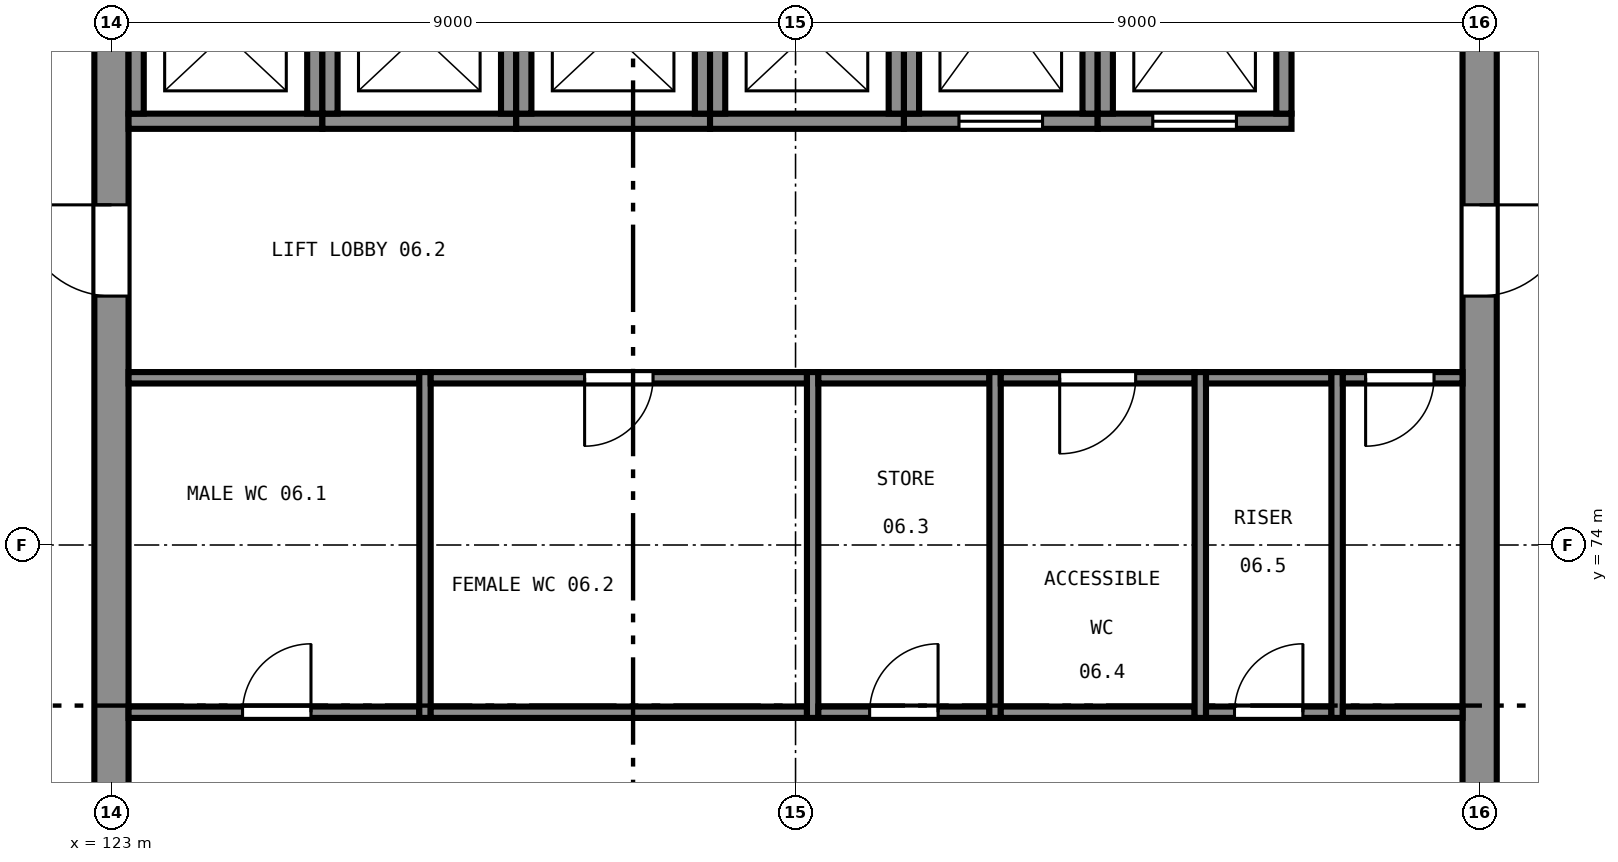
"""IFC4 building model, lengths in metres.
Left out: names, types, materials, properties, quantities, classifications, styles, units other than length and angle.
Written with IfcOpenShell. Run it as: python <this file> out.ifc"""

import sys

from ifc_helpers import new_model, si_unit, direction, frame, frame_2d, origin, place, context, subcontext, project, spatial, rectangle, extrude, element, fill, save


model = new_model("IFC4")
c1 = context("Model", 3, precision=1e-05, world=origin(), true_north=direction((0.0, 1.0)))
c2 = subcontext(c1, "Body", "Model", "MODEL_VIEW")
j1 = project(units=[si_unit("LENGTHUNIT", "METRE"), si_unit("PLANEANGLEUNIT", "RADIAN")], contexts=[c1])
p1 = place(None, origin())
s1 = spatial("IfcSite", under=j1, at=p1, CompositionType="ELEMENT")
p2 = place(p1, origin())
s2 = spatial("IfcBuilding", under=s1, at=p2, CompositionType="ELEMENT")
p3 = place(p2, frame((0.0, 0.0, 25.5)))
s3 = spatial("IfcBuildingStorey", under=s2, at=p3, CompositionType="ELEMENT", Elevation=25.5)
p4 = place(p3, frame((141.0, 65.225, 0.0), z_axis=(0.0, 0.0, 1.0), x_axis=(0.0, 1.0, 0.0)))
e1 = element("IfcWall", 1, at=p4, inside=s3, PredefinedType="SHEAR", context=c2, shape_type="SweptSolid", body=[
    extrude(rectangle(XDim=17.55, YDim=0.45, at=frame_2d((8.775, 0.0))), origin(), (0.0, 0.0, 1.0), 4.0),
])
p5 = place(p4, frame((4.3, 0.0, 0.0)))
e2 = element("IfcOpeningElement", 2, at=p5, cuts=e1, PredefinedType="OPENING", context=c2, shape_type="SweptSolid", body=[
    extrude(rectangle(XDim=1.2, YDim=2.1, at=frame_2d((0.6, 1.05))), frame((0.0, 0.235, 0.0), z_axis=(0.0, -1.0, 0.0), x_axis=(1.0, 0.0, 0.0)), (0.0, 0.0, 1.0), 0.47),
])
p6 = place(p4, frame((12.05, 0.0, 0.0)))
e3 = element("IfcOpeningElement", 3, at=p6, cuts=e1, PredefinedType="OPENING", context=c2, shape_type="SweptSolid", body=[
    extrude(rectangle(XDim=1.2, YDim=2.1, at=frame_2d((0.6, 1.05))), frame((0.0, 0.235, 0.0), z_axis=(0.0, -1.0, 0.0), x_axis=(1.0, 0.0, 0.0)), (0.0, 0.0, 1.0), 0.47),
])
p7 = place(p3, frame((123.0, 82.775, 0.0), z_axis=(0.0, 0.0, 1.0), x_axis=(0.0, -1.0, 0.0)))
e4 = element("IfcWall", 4, at=p7, inside=s3, PredefinedType="SHEAR", context=c2, shape_type="SweptSolid", body=[
    extrude(rectangle(XDim=17.55, YDim=0.45, at=frame_2d((8.775, 0.0))), origin(), (0.0, 0.0, 1.0), 4.0),
])
p8 = place(p7, frame((12.05, 0.0, 0.0)))
e5 = element("IfcOpeningElement", 5, at=p8, cuts=e4, PredefinedType="OPENING", context=c2, shape_type="SweptSolid", body=[
    extrude(rectangle(XDim=1.2, YDim=2.1, at=frame_2d((0.6, 1.05))), frame((0.0, 0.235, 0.0), z_axis=(0.0, -1.0, 0.0), x_axis=(1.0, 0.0, 0.0)), (0.0, 0.0, 1.0), 0.47),
])
p9 = place(p7, frame((4.3, 0.0, 0.0)))
e6 = element("IfcOpeningElement", 6, at=p9, cuts=e4, PredefinedType="OPENING", context=c2, shape_type="SweptSolid", body=[
    extrude(rectangle(XDim=1.2, YDim=2.1, at=frame_2d((0.6, 1.05))), frame((0.0, 0.235, 0.0), z_axis=(0.0, -1.0, 0.0), x_axis=(1.0, 0.0, 0.0)), (0.0, 0.0, 1.0), 0.47),
])
p10 = place(p3, frame((123.225, 79.575, 0.0), z_axis=(0.0, 0.0, 1.0), x_axis=(1.0, 0.0, 0.0)))
e7 = element("IfcWall", 7, at=p10, inside=s3, PredefinedType="SHEAR", context=c2, shape_type="SweptSolid", body=[
    extrude(rectangle(XDim=2.55, YDim=0.2, at=frame_2d((1.275, 0.0))), origin(), (0.0, 0.0, 1.0), 4.0),
])
for number, where, z_axis, x_axis in (
    (8, (125.675, 79.675, 0.0), (0.0, 0.0, 1.0), (0.0, 1.0, 0.0)),
    (9, (123.325, 81.775, 0.0), (0.0, 0.0, 1.0), (0.0, -1.0, 0.0)),
):
    element("IfcWall", number, at=place(p3, frame(where, z_axis=z_axis, x_axis=x_axis)), inside=s3, PredefinedType="SHEAR", context=c2, shape_type="SweptSolid", body=[
        extrude(rectangle(XDim=2.1, YDim=0.2, at=frame_2d((1.05, 0.0))), origin(), (0.0, 0.0, 1.0), 4.0),
    ])
p11 = place(p3, frame((125.775, 79.575, 0.0), z_axis=(0.0, 0.0, 1.0), x_axis=(1.0, 0.0, 0.0)))
e10 = element("IfcWall", 10, at=p11, inside=s3, PredefinedType="SHEAR", context=c2, shape_type="SweptSolid", body=[
    extrude(rectangle(XDim=2.55, YDim=0.2, at=frame_2d((1.275, 0.0))), origin(), (0.0, 0.0, 1.0), 4.0),
])
for number, where, z_axis, x_axis in (
    (11, (128.225, 79.675, 0.0), (0.0, 0.0, 1.0), (0.0, 1.0, 0.0)),
    (12, (125.875, 81.775, 0.0), (0.0, 0.0, 1.0), (0.0, -1.0, 0.0)),
):
    element("IfcWall", number, at=place(p3, frame(where, z_axis=z_axis, x_axis=x_axis)), inside=s3, PredefinedType="SHEAR", context=c2, shape_type="SweptSolid", body=[
        extrude(rectangle(XDim=2.1, YDim=0.2, at=frame_2d((1.05, 0.0))), origin(), (0.0, 0.0, 1.0), 4.0),
    ])
p12 = place(p3, frame((128.325, 79.575, 0.0), z_axis=(0.0, 0.0, 1.0), x_axis=(1.0, 0.0, 0.0)))
e13 = element("IfcWall", 13, at=p12, inside=s3, PredefinedType="SHEAR", context=c2, shape_type="SweptSolid", body=[
    extrude(rectangle(XDim=2.55, YDim=0.2, at=frame_2d((1.275, 0.0))), origin(), (0.0, 0.0, 1.0), 4.0),
])
for number, where, z_axis, x_axis in (
    (14, (130.775, 79.675, 0.0), (0.0, 0.0, 1.0), (0.0, 1.0, 0.0)),
    (15, (128.425, 81.775, 0.0), (0.0, 0.0, 1.0), (0.0, -1.0, 0.0)),
):
    element("IfcWall", number, at=place(p3, frame(where, z_axis=z_axis, x_axis=x_axis)), inside=s3, PredefinedType="SHEAR", context=c2, shape_type="SweptSolid", body=[
        extrude(rectangle(XDim=2.1, YDim=0.2, at=frame_2d((1.05, 0.0))), origin(), (0.0, 0.0, 1.0), 4.0),
    ])
p13 = place(p3, frame((130.875, 79.575, 0.0), z_axis=(0.0, 0.0, 1.0), x_axis=(1.0, 0.0, 0.0)))
e16 = element("IfcWall", 16, at=p13, inside=s3, PredefinedType="SHEAR", context=c2, shape_type="SweptSolid", body=[
    extrude(rectangle(XDim=2.55, YDim=0.2, at=frame_2d((1.275, 0.0))), origin(), (0.0, 0.0, 1.0), 4.0),
])
for number, where, z_axis, x_axis in (
    (17, (133.325, 79.675, 0.0), (0.0, 0.0, 1.0), (0.0, 1.0, 0.0)),
    (18, (130.975, 81.775, 0.0), (0.0, 0.0, 1.0), (0.0, -1.0, 0.0)),
):
    element("IfcWall", number, at=place(p3, frame(where, z_axis=z_axis, x_axis=x_axis)), inside=s3, PredefinedType="SHEAR", context=c2, shape_type="SweptSolid", body=[
        extrude(rectangle(XDim=2.1, YDim=0.2, at=frame_2d((1.05, 0.0))), origin(), (0.0, 0.0, 1.0), 4.0),
    ])
p14 = place(p3, frame((133.425, 79.575, 0.0), z_axis=(0.0, 0.0, 1.0), x_axis=(1.0, 0.0, 0.0)))
e19 = element("IfcWall", 19, at=p14, inside=s3, PredefinedType="SHEAR", context=c2, shape_type="SweptSolid", body=[
    extrude(rectangle(XDim=2.55, YDim=0.2, at=frame_2d((1.275, 0.0))), origin(), (0.0, 0.0, 1.0), 4.0),
])
p15 = place(p14, frame((0.725, 0.0, 0.0)))
e20 = element("IfcOpeningElement", 20, at=p15, cuts=e19, PredefinedType="OPENING", context=c2, shape_type="SweptSolid", body=[
    extrude(rectangle(XDim=1.1, YDim=2.1, at=frame_2d((0.55, 1.05))), frame((0.0, 0.11, 0.0), z_axis=(0.0, -1.0, 0.0), x_axis=(1.0, 0.0, 0.0)), (0.0, 0.0, 1.0), 0.22),
])
for number, where, z_axis, x_axis in (
    (21, (135.875, 79.675, 0.0), (0.0, 0.0, 1.0), (0.0, 1.0, 0.0)),
    (22, (133.525, 82.475, 0.0), (0.0, 0.0, 1.0), (0.0, -1.0, 0.0)),
):
    element("IfcWall", number, at=place(p3, frame(where, z_axis=z_axis, x_axis=x_axis)), inside=s3, PredefinedType="SHEAR", context=c2, shape_type="SweptSolid", body=[
        extrude(rectangle(XDim=2.8, YDim=0.2, at=frame_2d((1.4, 0.0))), origin(), (0.0, 0.0, 1.0), 4.0),
    ])
p16 = place(p3, frame((135.975, 79.575, 0.0), z_axis=(0.0, 0.0, 1.0), x_axis=(1.0, 0.0, 0.0)))
e23 = element("IfcWall", 23, at=p16, inside=s3, PredefinedType="SHEAR", context=c2, shape_type="SweptSolid", body=[
    extrude(rectangle(XDim=2.55, YDim=0.2, at=frame_2d((1.275, 0.0))), origin(), (0.0, 0.0, 1.0), 4.0),
])
p17 = place(p16, frame((0.725, 0.0, 0.0)))
e24 = element("IfcOpeningElement", 24, at=p17, cuts=e23, PredefinedType="OPENING", context=c2, shape_type="SweptSolid", body=[
    extrude(rectangle(XDim=1.1, YDim=2.1, at=frame_2d((0.55, 1.05))), frame((0.0, 0.11, 0.0), z_axis=(0.0, -1.0, 0.0), x_axis=(1.0, 0.0, 0.0)), (0.0, 0.0, 1.0), 0.22),
])
for number, where, z_axis, x_axis in (
    (25, (138.425, 79.675, 0.0), (0.0, 0.0, 1.0), (0.0, 1.0, 0.0)),
    (26, (136.075, 82.475, 0.0), (0.0, 0.0, 1.0), (0.0, -1.0, 0.0)),
):
    element("IfcWall", number, at=place(p3, frame(where, z_axis=z_axis, x_axis=x_axis)), inside=s3, PredefinedType="SHEAR", context=c2, shape_type="SweptSolid", body=[
        extrude(rectangle(XDim=2.8, YDim=0.2, at=frame_2d((1.4, 0.0))), origin(), (0.0, 0.0, 1.0), 4.0),
    ])
p18 = place(p3, frame((127.125, 71.725, 0.0), z_axis=(0.0, 0.0, 1.0), x_axis=(0.0, 1.0, 0.0)))
e27 = element("IfcWall", 27, at=p18, inside=s3, PredefinedType="PARTITIONING", context=c2, shape_type="SweptSolid", body=[
    extrude(rectangle(XDim=4.55, YDim=0.15, at=frame_2d((2.275, 0.0))), origin(), (0.0, 0.0, 1.0), 3.58),
])
p19 = place(p3, frame((123.225, 71.8, 0.0), z_axis=(0.0, 0.0, 1.0), x_axis=(1.0, 0.0, 0.0)))
e28 = element("IfcWall", 28, at=p19, inside=s3, PredefinedType="PARTITIONING", context=c2, shape_type="SweptSolid", body=[
    extrude(rectangle(XDim=3.825, YDim=0.15, at=frame_2d((1.913, 0.0))), origin(), (0.0, 0.0, 1.0), 3.58),
])
p20 = place(p19, frame((1.5, 0.0, 0.0)))
e29 = element("IfcOpeningElement", 29, at=p20, cuts=e28, PredefinedType="OPENING", context=c2, shape_type="SweptSolid", body=[
    extrude(rectangle(XDim=0.9, YDim=2.1, at=frame_2d((0.45, 1.05))), frame((0.0, 0.085, 0.0), z_axis=(0.0, -1.0, 0.0), x_axis=(1.0, 0.0, 0.0)), (0.0, 0.0, 1.0), 0.17),
])
p21 = place(p3, frame((123.225, 76.2, 0.0), z_axis=(0.0, 0.0, 1.0), x_axis=(1.0, 0.0, 0.0)))
e30 = element("IfcWall", 30, at=p21, inside=s3, PredefinedType="PARTITIONING", context=c2, shape_type="SweptSolid", body=[
    extrude(rectangle(XDim=3.825, YDim=0.15, at=frame_2d((1.913, 0.0))), origin(), (0.0, 0.0, 1.0), 3.58),
])
p22 = place(p3, frame((132.225, 71.725, 0.0), z_axis=(0.0, 0.0, 1.0), x_axis=(0.0, 1.0, 0.0)))
e31 = element("IfcWall", 31, at=p22, inside=s3, PredefinedType="PARTITIONING", context=c2, shape_type="SweptSolid", body=[
    extrude(rectangle(XDim=4.55, YDim=0.15, at=frame_2d((2.275, 0.0))), origin(), (0.0, 0.0, 1.0), 3.58),
])
p23 = place(p3, frame((127.2, 71.8, 0.0), z_axis=(0.0, 0.0, 1.0), x_axis=(1.0, 0.0, 0.0)))
e32 = element("IfcWall", 32, at=p23, inside=s3, PredefinedType="PARTITIONING", context=c2, shape_type="SweptSolid", body=[
    extrude(rectangle(XDim=4.95, YDim=0.15, at=frame_2d((2.475, 0.0))), origin(), (0.0, 0.0, 1.0), 3.58),
])
p24 = place(p3, frame((127.2, 76.2, 0.0), z_axis=(0.0, 0.0, 1.0), x_axis=(1.0, 0.0, 0.0)))
e33 = element("IfcWall", 33, at=p24, inside=s3, PredefinedType="PARTITIONING", context=c2, shape_type="SweptSolid", body=[
    extrude(rectangle(XDim=4.95, YDim=0.15, at=frame_2d((2.475, 0.0))), origin(), (0.0, 0.0, 1.0), 3.58),
])
p25 = place(p24, frame((2.025, 0.0, 0.0)))
e34 = element("IfcOpeningElement", 34, at=p25, cuts=e33, PredefinedType="OPENING", context=c2, shape_type="SweptSolid", body=[
    extrude(rectangle(XDim=0.9, YDim=2.1, at=frame_2d((0.45, 1.05))), frame((0.0, 0.085, 0.0), z_axis=(0.0, -1.0, 0.0), x_axis=(1.0, 0.0, 0.0)), (0.0, 0.0, 1.0), 0.17),
])
p26 = place(p3, frame((134.625, 71.725, 0.0), z_axis=(0.0, 0.0, 1.0), x_axis=(0.0, 1.0, 0.0)))
e35 = element("IfcWall", 35, at=p26, inside=s3, PredefinedType="PARTITIONING", context=c2, shape_type="SweptSolid", body=[
    extrude(rectangle(XDim=4.55, YDim=0.15, at=frame_2d((2.275, 0.0))), origin(), (0.0, 0.0, 1.0), 3.58),
])
p27 = place(p3, frame((132.3, 71.8, 0.0), z_axis=(0.0, 0.0, 1.0), x_axis=(1.0, 0.0, 0.0)))
e36 = element("IfcWall", 36, at=p27, inside=s3, PredefinedType="PARTITIONING", context=c2, shape_type="SweptSolid", body=[
    extrude(rectangle(XDim=2.25, YDim=0.15, at=frame_2d((1.125, 0.0))), origin(), (0.0, 0.0, 1.0), 3.58),
])
p28 = place(p27, frame((0.675, 0.0, 0.0)))
e37 = element("IfcOpeningElement", 37, at=p28, cuts=e36, PredefinedType="OPENING", context=c2, shape_type="SweptSolid", body=[
    extrude(rectangle(XDim=0.9, YDim=2.1, at=frame_2d((0.45, 1.05))), frame((0.0, 0.085, 0.0), z_axis=(0.0, -1.0, 0.0), x_axis=(1.0, 0.0, 0.0)), (0.0, 0.0, 1.0), 0.17),
])
p29 = place(p3, frame((132.3, 76.2, 0.0), z_axis=(0.0, 0.0, 1.0), x_axis=(1.0, 0.0, 0.0)))
e38 = element("IfcWall", 38, at=p29, inside=s3, PredefinedType="PARTITIONING", context=c2, shape_type="SweptSolid", body=[
    extrude(rectangle(XDim=2.25, YDim=0.15, at=frame_2d((1.125, 0.0))), origin(), (0.0, 0.0, 1.0), 3.58),
])
p30 = place(p3, frame((137.325, 71.725, 0.0), z_axis=(0.0, 0.0, 1.0), x_axis=(0.0, 1.0, 0.0)))
e39 = element("IfcWall", 39, at=p30, inside=s3, PredefinedType="PARTITIONING", context=c2, shape_type="SweptSolid", body=[
    extrude(rectangle(XDim=4.55, YDim=0.15, at=frame_2d((2.275, 0.0))), origin(), (0.0, 0.0, 1.0), 3.58),
])
p31 = place(p3, frame((134.7, 71.8, 0.0), z_axis=(0.0, 0.0, 1.0), x_axis=(1.0, 0.0, 0.0)))
e40 = element("IfcWall", 40, at=p31, inside=s3, PredefinedType="PARTITIONING", context=c2, shape_type="SweptSolid", body=[
    extrude(rectangle(XDim=2.55, YDim=0.15, at=frame_2d((1.275, 0.0))), origin(), (0.0, 0.0, 1.0), 3.58),
])
p32 = place(p3, frame((134.7, 76.2, 0.0), z_axis=(0.0, 0.0, 1.0), x_axis=(1.0, 0.0, 0.0)))
e41 = element("IfcWall", 41, at=p32, inside=s3, PredefinedType="PARTITIONING", context=c2, shape_type="SweptSolid", body=[
    extrude(rectangle(XDim=2.55, YDim=0.15, at=frame_2d((1.275, 0.0))), origin(), (0.0, 0.0, 1.0), 3.58),
])
p33 = place(p32, frame((0.775, 0.0, 0.0)))
e42 = element("IfcOpeningElement", 42, at=p33, cuts=e41, PredefinedType="OPENING", context=c2, shape_type="SweptSolid", body=[
    extrude(rectangle(XDim=1.0, YDim=2.1, at=frame_2d((0.5, 1.05))), frame((0.0, 0.085, 0.0), z_axis=(0.0, -1.0, 0.0), x_axis=(1.0, 0.0, 0.0)), (0.0, 0.0, 1.0), 0.17),
])
p34 = place(p3, frame((139.125, 71.725, 0.0), z_axis=(0.0, 0.0, 1.0), x_axis=(0.0, 1.0, 0.0)))
e43 = element("IfcWall", 43, at=p34, inside=s3, PredefinedType="PARTITIONING", context=c2, shape_type="SweptSolid", body=[
    extrude(rectangle(XDim=4.55, YDim=0.15, at=frame_2d((2.275, 0.0))), origin(), (0.0, 0.0, 1.0), 3.58),
])
p35 = place(p3, frame((137.4, 71.8, 0.0), z_axis=(0.0, 0.0, 1.0), x_axis=(1.0, 0.0, 0.0)))
e44 = element("IfcWall", 44, at=p35, inside=s3, PredefinedType="PARTITIONING", context=c2, shape_type="SweptSolid", body=[
    extrude(rectangle(XDim=1.65, YDim=0.15, at=frame_2d((0.825, 0.0))), origin(), (0.0, 0.0, 1.0), 3.58),
])
p36 = place(p35, frame((0.375, 0.0, 0.0)))
e45 = element("IfcOpeningElement", 45, at=p36, cuts=e44, PredefinedType="OPENING", context=c2, shape_type="SweptSolid", body=[
    extrude(rectangle(XDim=0.9, YDim=2.1, at=frame_2d((0.45, 1.05))), frame((0.0, 0.085, 0.0), z_axis=(0.0, -1.0, 0.0), x_axis=(1.0, 0.0, 0.0)), (0.0, 0.0, 1.0), 0.17),
])
p37 = place(p3, frame((137.4, 76.2, 0.0), z_axis=(0.0, 0.0, 1.0), x_axis=(1.0, 0.0, 0.0)))
e46 = element("IfcWall", 46, at=p37, inside=s3, PredefinedType="PARTITIONING", context=c2, shape_type="SweptSolid", body=[
    extrude(rectangle(XDim=1.65, YDim=0.15, at=frame_2d((0.825, 0.0))), origin(), (0.0, 0.0, 1.0), 3.58),
])
p38 = place(p3, frame((139.2, 71.8, 0.0), z_axis=(0.0, 0.0, 1.0), x_axis=(1.0, 0.0, 0.0)))
e47 = element("IfcWall", 47, at=p38, inside=s3, PredefinedType="PARTITIONING", context=c2, shape_type="SweptSolid", body=[
    extrude(rectangle(XDim=1.575, YDim=0.15, at=frame_2d((0.788, 0.0))), origin(), (0.0, 0.0, 1.0), 3.58),
])
p39 = place(p3, frame((139.2, 76.2, 0.0), z_axis=(0.0, 0.0, 1.0), x_axis=(1.0, 0.0, 0.0)))
e48 = element("IfcWall", 48, at=p39, inside=s3, PredefinedType="PARTITIONING", context=c2, shape_type="SweptSolid", body=[
    extrude(rectangle(XDim=1.575, YDim=0.15, at=frame_2d((0.788, 0.0))), origin(), (0.0, 0.0, 1.0), 3.58),
])
p40 = place(p39, frame((0.3, 0.0, 0.0)))
e49 = element("IfcOpeningElement", 49, at=p40, cuts=e48, PredefinedType="OPENING", context=c2, shape_type="SweptSolid", body=[
    extrude(rectangle(XDim=0.9, YDim=2.1, at=frame_2d((0.45, 1.05))), frame((0.0, 0.085, 0.0), z_axis=(0.0, -1.0, 0.0), x_axis=(1.0, 0.0, 0.0)), (0.0, 0.0, 1.0), 0.17),
])
p41 = place(p15, origin())
e50 = element("IfcDoor", 50, at=p41, inside=s3, OperationType="SLIDING_TO_LEFT", PredefinedType="DOOR", context=c2, shape_type="SweptSolid", body=[
    extrude(rectangle(XDim=1.1, YDim=2.1, at=frame_2d((0.55, 1.05))), frame((0.0, 0.025, 0.0), z_axis=(0.0, -1.0, 0.0), x_axis=(1.0, 0.0, 0.0)), (0.0, 0.0, 1.0), 0.05),
])
fill(e20, e50)
p42 = place(p17, origin())
e51 = element("IfcDoor", 51, at=p42, inside=s3, OperationType="SLIDING_TO_LEFT", PredefinedType="DOOR", context=c2, shape_type="SweptSolid", body=[
    extrude(rectangle(XDim=1.1, YDim=2.1, at=frame_2d((0.55, 1.05))), frame((0.0, 0.025, 0.0), z_axis=(0.0, -1.0, 0.0), x_axis=(1.0, 0.0, 0.0)), (0.0, 0.0, 1.0), 0.05),
])
fill(e24, e51)
p43 = place(p9, frame((1.2, 0.0, 0.0), z_axis=(0.0, 0.0, 1.0), x_axis=(-1.0, 0.0, 0.0)))
e52 = element("IfcDoor", 52, at=p43, inside=s3, OperationType="SINGLE_SWING_LEFT", PredefinedType="DOOR", context=c2, shape_type="SweptSolid", body=[
    extrude(rectangle(XDim=1.2, YDim=2.1, at=frame_2d((0.6, 1.05))), frame((0.0, 0.025, 0.0), z_axis=(0.0, -1.0, 0.0), x_axis=(1.0, 0.0, 0.0)), (0.0, 0.0, 1.0), 0.05),
])
fill(e6, e52)
p44 = place(p6, frame((1.2, 0.0, 0.0), z_axis=(0.0, 0.0, 1.0), x_axis=(-1.0, 0.0, 0.0)))
e53 = element("IfcDoor", 53, at=p44, inside=s3, OperationType="SINGLE_SWING_RIGHT", PredefinedType="DOOR", context=c2, shape_type="SweptSolid", body=[
    extrude(rectangle(XDim=1.2, YDim=2.1, at=frame_2d((0.6, 1.05))), frame((0.0, 0.025, 0.0), z_axis=(0.0, -1.0, 0.0), x_axis=(1.0, 0.0, 0.0)), (0.0, 0.0, 1.0), 0.05),
])
fill(e3, e53)
p45 = place(p20, origin())
e54 = element("IfcDoor", 54, at=p45, inside=s3, OperationType="SINGLE_SWING_LEFT", PredefinedType="DOOR", context=c2, shape_type="SweptSolid", body=[
    extrude(rectangle(XDim=0.9, YDim=2.1, at=frame_2d((0.45, 1.05))), frame((0.0, 0.025, 0.0), z_axis=(0.0, -1.0, 0.0), x_axis=(1.0, 0.0, 0.0)), (0.0, 0.0, 1.0), 0.05),
])
fill(e29, e54)
p46 = place(p25, frame((0.9, 0.0, 0.0), z_axis=(0.0, 0.0, 1.0), x_axis=(-1.0, 0.0, 0.0)))
e55 = element("IfcDoor", 55, at=p46, inside=s3, OperationType="SINGLE_SWING_LEFT", PredefinedType="DOOR", context=c2, shape_type="SweptSolid", body=[
    extrude(rectangle(XDim=0.9, YDim=2.1, at=frame_2d((0.45, 1.05))), frame((0.0, 0.025, 0.0), z_axis=(0.0, -1.0, 0.0), x_axis=(1.0, 0.0, 0.0)), (0.0, 0.0, 1.0), 0.05),
])
fill(e34, e55)
p47 = place(p28, origin())
e56 = element("IfcDoor", 56, at=p47, inside=s3, OperationType="SINGLE_SWING_LEFT", PredefinedType="DOOR", context=c2, shape_type="SweptSolid", body=[
    extrude(rectangle(XDim=0.9, YDim=2.1, at=frame_2d((0.45, 1.05))), frame((0.0, 0.025, 0.0), z_axis=(0.0, -1.0, 0.0), x_axis=(1.0, 0.0, 0.0)), (0.0, 0.0, 1.0), 0.05),
])
fill(e37, e56)
p48 = place(p33, frame((1.0, 0.0, 0.0), z_axis=(0.0, 0.0, 1.0), x_axis=(-1.0, 0.0, 0.0)))
e57 = element("IfcDoor", 57, at=p48, inside=s3, OperationType="SINGLE_SWING_LEFT", PredefinedType="DOOR", context=c2, shape_type="SweptSolid", body=[
    extrude(rectangle(XDim=1.0, YDim=2.1, at=frame_2d((0.5, 1.05))), frame((0.0, 0.025, 0.0), z_axis=(0.0, -1.0, 0.0), x_axis=(1.0, 0.0, 0.0)), (0.0, 0.0, 1.0), 0.05),
])
fill(e42, e57)
p49 = place(p36, origin())
e58 = element("IfcDoor", 58, at=p49, inside=s3, OperationType="SINGLE_SWING_LEFT", PredefinedType="DOOR", context=c2, shape_type="SweptSolid", body=[
    extrude(rectangle(XDim=0.9, YDim=2.1, at=frame_2d((0.45, 1.05))), frame((0.0, 0.025, 0.0), z_axis=(0.0, -1.0, 0.0), x_axis=(1.0, 0.0, 0.0)), (0.0, 0.0, 1.0), 0.05),
])
fill(e45, e58)
p50 = place(p40, frame((0.9, 0.0, 0.0), z_axis=(0.0, 0.0, 1.0), x_axis=(-1.0, 0.0, 0.0)))
e59 = element("IfcDoor", 59, at=p50, inside=s3, OperationType="SINGLE_SWING_LEFT", PredefinedType="DOOR", context=c2, shape_type="SweptSolid", body=[
    extrude(rectangle(XDim=0.9, YDim=2.1, at=frame_2d((0.45, 1.05))), frame((0.0, 0.025, 0.0), z_axis=(0.0, -1.0, 0.0), x_axis=(1.0, 0.0, 0.0)), (0.0, 0.0, 1.0), 0.05),
])
fill(e49, e59)
save(model, sys.argv[1])
